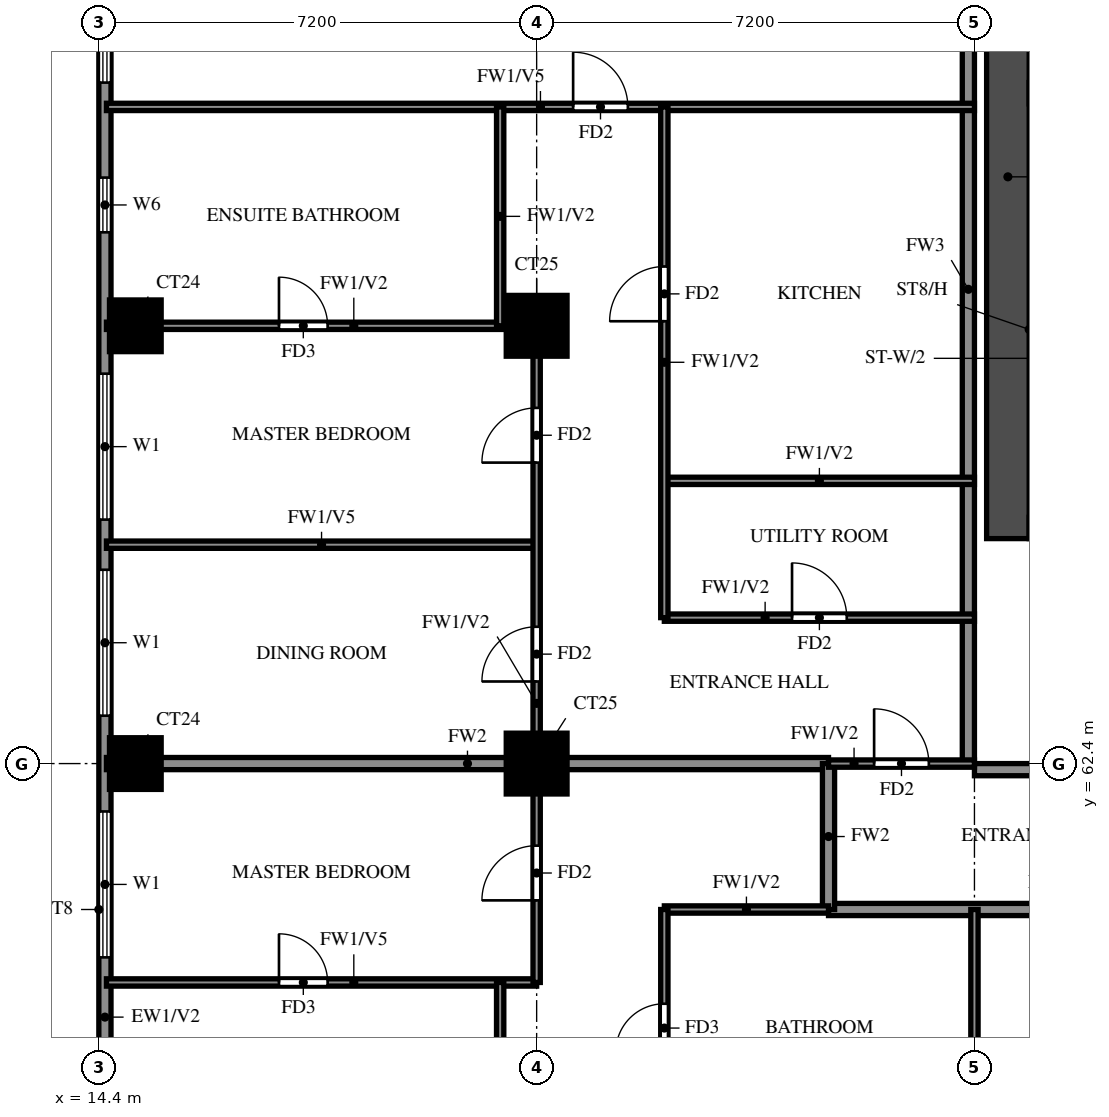
"""IFC4 building model, lengths in metres.
Left out: names, types, materials, properties, quantities, classifications, styles, units other than length and angle.
Written with IfcOpenShell. Run it as: python <this file> out.ifc"""

import sys

from ifc_helpers import new_model, si_unit, direction, frame, frame_2d, origin, origin_2d, place, context, subcontext, project, spatial, rectangle, extrude, source, transform, mapped, element, fill, save


model = new_model("IFC4")
c1 = context("Model", 3, precision=1e-05, world=origin(), true_north=direction((0.0, 1.0)))
c2 = subcontext(c1, "Body", "Model", "MODEL_VIEW")
j1 = project(units=[si_unit("LENGTHUNIT", "METRE"), si_unit("PLANEANGLEUNIT", "RADIAN")], contexts=[c1])
p1 = place(None, origin())
s1 = spatial("IfcSite", under=j1, at=p1, CompositionType="ELEMENT")
p2 = place(p1, origin())
s2 = spatial("IfcBuilding", under=s1, at=p2, CompositionType="ELEMENT")
p3 = place(p2, frame((0.0, 0.0, 146.5)))
s3 = spatial("IfcBuildingStorey", under=s2, at=p3, CompositionType="ELEMENT", Elevation=146.5)
m1 = source(origin(), c2, "Body", "SweptSolid", [
    extrude(rectangle(XDim=0.85, YDim=0.85, at=origin_2d()), origin(), (0.0, 0.0, 1.0), 3.2),
])
p4 = place(p3, frame((15.0, 62.4, 0.0), z_axis=(0.0, 0.0, 1.0), x_axis=(1.0, 0.0, 0.0)))
e1 = element("IfcColumn", 1, at=p4, inside=s3, PredefinedType="COLUMN", context=c2, shape_type="MappedRepresentation", body=[
    mapped(m1, transform((0.0, 0.0, 0.0))),
])
m2 = source(origin(), c2, "Body", "SweptSolid", [
    extrude(rectangle(XDim=1.0, YDim=1.0, at=origin_2d()), origin(), (0.0, 0.0, 1.0), 3.2),
])
p5 = place(p3, frame((21.6, 62.4, 0.0), z_axis=(0.0, 0.0, 1.0), x_axis=(1.0, 0.0, 0.0)))
e2 = element("IfcColumn", 2, at=p5, inside=s3, PredefinedType="COLUMN", context=c2, shape_type="MappedRepresentation", body=[
    mapped(m2, transform((0.0, 0.0, 0.0))),
])
p6 = place(p3, frame((15.0, 69.6, 0.0), z_axis=(0.0, 0.0, 1.0), x_axis=(1.0, 0.0, 0.0)))
e3 = element("IfcColumn", 3, at=p6, inside=s3, PredefinedType="COLUMN", context=c2, shape_type="MappedRepresentation", body=[
    mapped(m1, transform((0.0, 0.0, 0.0))),
])
p7 = place(p3, frame((21.6, 69.6, 0.0), z_axis=(0.0, 0.0, 1.0), x_axis=(1.0, 0.0, 0.0)))
e4 = element("IfcColumn", 4, at=p7, inside=s3, PredefinedType="COLUMN", context=c2, shape_type="MappedRepresentation", body=[
    mapped(m2, transform((0.0, 0.0, 0.0))),
])
p8 = place(p3, frame((29.35, 66.1, 0.0), z_axis=(0.0, 0.0, 1.0), x_axis=(0.0, 1.0, 0.0)))
e5 = element("IfcWall", 5, at=p8, inside=s3, PredefinedType="SHEAR", context=c2, shape_type="SweptSolid", body=[
    extrude(rectangle(XDim=11.9, YDim=0.7, at=frame_2d((5.95, 0.0))), origin(), (0.0, 0.0, 1.0), 3.2),
])
p9 = place(p3, frame((14.5, 76.6, 0.0), z_axis=(0.0, 0.0, 1.0), x_axis=(0.0, -1.0, 0.0)))
e6 = element("IfcWall", 6, at=p9, inside=s3, PredefinedType="SOLIDWALL", context=c2, shape_type="SweptSolid", body=[
    extrude(rectangle(XDim=33.4, YDim=0.2, at=frame_2d((16.7, 0.0))), origin(), (0.0, 0.0, 1.0), 3.2),
])
p10 = place(p9, frame((29.887, 0.0, 0.6)))
e7 = element("IfcOpeningElement", 7, at=p10, cuts=e6, PredefinedType="OPENING", context=c2, shape_type="SweptSolid", body=[
    extrude(rectangle(XDim=2.4, YDim=2.4, at=frame_2d((1.2, 1.2))), frame((0.0, 0.11, 0.0), z_axis=(0.0, -1.0, 0.0), x_axis=(1.0, 0.0, 0.0)), (0.0, 0.0, 1.0), 0.22),
])
p11 = place(p9, frame((22.358, 0.0, 0.6)))
e8 = element("IfcOpeningElement", 8, at=p11, cuts=e6, PredefinedType="OPENING", context=c2, shape_type="SweptSolid", body=[
    extrude(rectangle(XDim=2.4, YDim=2.4, at=frame_2d((1.2, 1.2))), frame((0.0, 0.11, 0.0), z_axis=(0.0, -1.0, 0.0), x_axis=(1.0, 0.0, 0.0)), (0.0, 0.0, 1.0), 0.22),
])
p12 = place(p9, frame((25.242, 0.0, 0.6)))
e9 = element("IfcOpeningElement", 9, at=p12, cuts=e6, PredefinedType="OPENING", context=c2, shape_type="SweptSolid", body=[
    extrude(rectangle(XDim=2.4, YDim=2.4, at=frame_2d((1.2, 1.2))), frame((0.0, 0.11, 0.0), z_axis=(0.0, -1.0, 0.0), x_axis=(1.0, 0.0, 0.0)), (0.0, 0.0, 1.0), 0.22),
])
p13 = place(p9, frame((14.988, 0.0, 0.6)))
e10 = element("IfcOpeningElement", 10, at=p13, cuts=e6, PredefinedType="OPENING", context=c2, shape_type="SweptSolid", body=[
    extrude(rectangle(XDim=2.4, YDim=2.4, at=frame_2d((1.2, 1.2))), frame((0.0, 0.11, 0.0), z_axis=(0.0, -1.0, 0.0), x_axis=(1.0, 0.0, 0.0)), (0.0, 0.0, 1.0), 0.22),
])
p14 = place(p9, frame((18.962, 0.0, 1.5)))
e11 = element("IfcOpeningElement", 11, at=p14, cuts=e6, PredefinedType="OPENING", context=c2, shape_type="SweptSolid", body=[
    extrude(rectangle(XDim=0.9, YDim=0.9, at=frame_2d((0.45, 0.45))), frame((0.0, 0.11, 0.0), z_axis=(0.0, -1.0, 0.0), x_axis=(1.0, 0.0, 0.0)), (0.0, 0.0, 1.0), 0.22),
])
p15 = place(p9, frame((11.012, 0.0, 0.6)))
e12 = element("IfcOpeningElement", 12, at=p15, cuts=e6, PredefinedType="OPENING", context=c2, shape_type="SweptSolid", body=[
    extrude(rectangle(XDim=2.4, YDim=2.4, at=frame_2d((1.2, 1.2))), frame((0.0, 0.11, 0.0), z_axis=(0.0, -1.0, 0.0), x_axis=(1.0, 0.0, 0.0)), (0.0, 0.0, 1.0), 0.22),
])
p16 = place(p9, frame((7.788, 0.0, 0.6)))
e13 = element("IfcOpeningElement", 13, at=p16, cuts=e6, PredefinedType="OPENING", context=c2, shape_type="SweptSolid", body=[
    extrude(rectangle(XDim=2.4, YDim=2.4, at=frame_2d((1.2, 1.2))), frame((0.0, 0.11, 0.0), z_axis=(0.0, -1.0, 0.0), x_axis=(1.0, 0.0, 0.0)), (0.0, 0.0, 1.0), 0.22),
])
p17 = place(p9, frame((4.562, 0.0, 1.5)))
e14 = element("IfcOpeningElement", 14, at=p17, cuts=e6, PredefinedType="OPENING", context=c2, shape_type="SweptSolid", body=[
    extrude(rectangle(XDim=0.9, YDim=0.9, at=frame_2d((0.45, 0.45))), frame((0.0, 0.11, 0.0), z_axis=(0.0, -1.0, 0.0), x_axis=(1.0, 0.0, 0.0)), (0.0, 0.0, 1.0), 0.22),
])
p18 = place(p9, frame((0.6, 0.0, 0.6)))
e15 = element("IfcOpeningElement", 15, at=p18, cuts=e6, PredefinedType="OPENING", context=c2, shape_type="SweptSolid", body=[
    extrude(rectangle(XDim=2.4, YDim=2.4, at=frame_2d((1.2, 1.2))), frame((0.0, 0.11, 0.0), z_axis=(0.0, -1.0, 0.0), x_axis=(1.0, 0.0, 0.0)), (0.0, 0.0, 1.0), 0.22),
])
p19 = place(p3, frame((28.8, 62.3, 0.0), z_axis=(0.0, 0.0, 1.0), x_axis=(1.0, 0.0, 0.0)))
e16 = element("IfcWall", 16, at=p19, inside=s3, PredefinedType="SOLIDWALL", context=c2, shape_type="SweptSolid", body=[
    extrude(rectangle(XDim=4.8, YDim=0.2, at=frame_2d((2.4, 0.0))), origin(), (0.0, 0.0, 1.0), 3.2),
])
p20 = place(p3, frame((28.7, 62.4, 0.0), z_axis=(0.0, 0.0, 1.0), x_axis=(0.0, 1.0, 0.0)))
e17 = element("IfcWall", 17, at=p20, inside=s3, PredefinedType="SOLIDWALL", context=c2, shape_type="SweptSolid", body=[
    extrude(rectangle(XDim=15.6, YDim=0.2, at=frame_2d((7.8, 0.0))), origin(), (0.0, 0.0, 1.0), 3.2),
])
p21 = place(p3, frame((26.4, 60.0, 0.0), z_axis=(0.0, 0.0, 1.0), x_axis=(1.0, 0.0, 0.0)))
e18 = element("IfcWall", 18, at=p21, inside=s3, PredefinedType="SOLIDWALL", context=c2, shape_type="SweptSolid", body=[
    extrude(rectangle(XDim=7.2, YDim=0.2, at=frame_2d((3.6, 0.0))), origin(), (0.0, 0.0, 1.0), 3.2),
])
p22 = place(p3, frame((14.525, 62.4, 0.0), z_axis=(0.0, 0.0, 1.0), x_axis=(1.0, 0.0, 0.0)))
e19 = element("IfcWall", 19, at=p22, inside=s3, PredefinedType="SOLIDWALL", context=c2, shape_type="SweptSolid", body=[
    extrude(rectangle(XDim=11.875, YDim=0.2, at=frame_2d((5.938, 0.0))), origin(), (0.0, 0.0, 1.0), 3.2),
])
p23 = place(p3, frame((26.4, 60.0, 0.0), z_axis=(0.0, 0.0, 1.0), x_axis=(0.0, 1.0, 0.0)))
e20 = element("IfcWall", 20, at=p23, inside=s3, PredefinedType="SOLIDWALL", context=c2, shape_type="SweptSolid", body=[
    extrude(rectangle(XDim=2.4, YDim=0.2, at=frame_2d((1.2, 0.0))), origin(), (0.0, 0.0, 1.0), 3.2),
])
p24 = place(p3, frame((14.525, 58.8, 0.0), z_axis=(0.0, 0.0, 1.0), x_axis=(1.0, 0.0, 0.0)))
e21 = element("IfcWall", 21, at=p24, inside=s3, PredefinedType="PARTITIONING", context=c2, shape_type="SweptSolid", body=[
    extrude(rectangle(XDim=7.075, YDim=0.12, at=frame_2d((3.538, 0.0))), origin(), (0.0, 0.0, 1.0), 2.3),
])
p25 = place(p24, frame((2.837, 0.0, 0.0)))
e22 = element("IfcOpeningElement", 22, at=p25, cuts=e21, PredefinedType="OPENING", context=c2, shape_type="SweptSolid", body=[
    extrude(rectangle(XDim=0.8, YDim=2.1, at=frame_2d((0.4, 1.05))), frame((0.0, 0.07, 0.0), z_axis=(0.0, -1.0, 0.0), x_axis=(1.0, 0.0, 0.0)), (0.0, 0.0, 1.0), 0.14),
])
p26 = place(p3, frame((23.7, 60.0, 0.0), z_axis=(0.0, 0.0, 1.0), x_axis=(1.0, 0.0, 0.0)))
e23 = element("IfcWall", 23, at=p26, inside=s3, PredefinedType="PARTITIONING", context=c2, shape_type="SweptSolid", body=[
    extrude(rectangle(XDim=2.7, YDim=0.12, at=frame_2d((1.35, 0.0))), origin(), (0.0, 0.0, 1.0), 3.2),
])
p27 = place(p3, frame((26.4, 62.4, 0.0), z_axis=(0.0, 0.0, 1.0), x_axis=(1.0, 0.0, 0.0)))
e24 = element("IfcWall", 24, at=p27, inside=s3, PredefinedType="PARTITIONING", context=c2, shape_type="SweptSolid", body=[
    extrude(rectangle(XDim=2.4, YDim=0.12, at=frame_2d((1.2, 0.0))), origin(), (0.0, 0.0, 1.0), 3.2),
])
p28 = place(p27, frame((0.75, 0.0, 0.0)))
e25 = element("IfcOpeningElement", 25, at=p28, cuts=e24, PredefinedType="OPENING", context=c2, shape_type="SweptSolid", body=[
    extrude(rectangle(XDim=0.9, YDim=2.1, at=frame_2d((0.45, 1.05))), frame((0.0, 0.07, 0.0), z_axis=(0.0, -1.0, 0.0), x_axis=(1.0, 0.0, 0.0)), (0.0, 0.0, 1.0), 0.14),
])
p29 = place(p3, frame((23.7, 64.8, 0.0), z_axis=(0.0, 0.0, 1.0), x_axis=(1.0, 0.0, 0.0)))
e26 = element("IfcWall", 26, at=p29, inside=s3, PredefinedType="PARTITIONING", context=c2, shape_type="SweptSolid", body=[
    extrude(rectangle(XDim=5.1, YDim=0.12, at=frame_2d((2.55, 0.0))), origin(), (0.0, 0.0, 1.0), 3.2),
])
p30 = place(p29, frame((2.1, 0.0, 0.0)))
e27 = element("IfcOpeningElement", 27, at=p30, cuts=e26, PredefinedType="OPENING", context=c2, shape_type="SweptSolid", body=[
    extrude(rectangle(XDim=0.9, YDim=2.1, at=frame_2d((0.45, 1.05))), frame((0.0, 0.07, 0.0), z_axis=(0.0, -1.0, 0.0), x_axis=(1.0, 0.0, 0.0)), (0.0, 0.0, 1.0), 0.14),
])
p31 = place(p3, frame((14.525, 66.0, 0.0), z_axis=(0.0, 0.0, 1.0), x_axis=(1.0, 0.0, 0.0)))
e28 = element("IfcWall", 28, at=p31, inside=s3, PredefinedType="PARTITIONING", context=c2, shape_type="SweptSolid", body=[
    extrude(rectangle(XDim=7.075, YDim=0.12, at=frame_2d((3.538, 0.0))), origin(), (0.0, 0.0, 1.0), 2.3),
])
p32 = place(p3, frame((23.7, 67.05, 0.0), z_axis=(0.0, 0.0, 1.0), x_axis=(1.0, 0.0, 0.0)))
e29 = element("IfcWall", 29, at=p32, inside=s3, PredefinedType="PARTITIONING", context=c2, shape_type="SweptSolid", body=[
    extrude(rectangle(XDim=5.1, YDim=0.12, at=frame_2d((2.55, 0.0))), origin(), (0.0, 0.0, 1.0), 3.2),
])
p33 = place(p3, frame((14.525, 69.6, 0.0), z_axis=(0.0, 0.0, 1.0), x_axis=(1.0, 0.0, 0.0)))
e30 = element("IfcWall", 30, at=p33, inside=s3, PredefinedType="PARTITIONING", context=c2, shape_type="SweptSolid", body=[
    extrude(rectangle(XDim=7.075, YDim=0.12, at=frame_2d((3.538, 0.0))), origin(), (0.0, 0.0, 1.0), 3.2),
])
p34 = place(p33, frame((2.837, 0.0, 0.0)))
e31 = element("IfcOpeningElement", 31, at=p34, cuts=e30, PredefinedType="OPENING", context=c2, shape_type="SweptSolid", body=[
    extrude(rectangle(XDim=0.8, YDim=2.1, at=frame_2d((0.4, 1.05))), frame((0.0, 0.07, 0.0), z_axis=(0.0, -1.0, 0.0), x_axis=(1.0, 0.0, 0.0)), (0.0, 0.0, 1.0), 0.14),
])
p35 = place(p3, frame((14.525, 73.2, 0.0), z_axis=(0.0, 0.0, 1.0), x_axis=(1.0, 0.0, 0.0)))
e32 = element("IfcWall", 32, at=p35, inside=s3, PredefinedType="PARTITIONING", context=c2, shape_type="SweptSolid", body=[
    extrude(rectangle(XDim=14.275, YDim=0.12, at=frame_2d((7.138, 0.0))), origin(), (0.0, 0.0, 1.0), 2.3),
])
p36 = place(p35, frame((7.675, 0.0, 0.0)))
e33 = element("IfcOpeningElement", 33, at=p36, cuts=e32, PredefinedType="OPENING", context=c2, shape_type="SweptSolid", body=[
    extrude(rectangle(XDim=0.9, YDim=2.1, at=frame_2d((0.45, 1.05))), frame((0.0, 0.07, 0.0), z_axis=(0.0, -1.0, 0.0), x_axis=(1.0, 0.0, 0.0)), (0.0, 0.0, 1.0), 0.14),
])
p37 = place(p3, frame((21.0, 55.2, 0.0), z_axis=(0.0, 0.0, 1.0), x_axis=(0.0, 1.0, 0.0)))
e34 = element("IfcWall", 34, at=p37, inside=s3, PredefinedType="PARTITIONING", context=c2, shape_type="SweptSolid", body=[
    extrude(rectangle(XDim=3.6, YDim=0.12, at=frame_2d((1.8, 0.0))), origin(), (0.0, 0.0, 1.0), 3.2),
])
p38 = place(p3, frame((21.0, 69.6, 0.0), z_axis=(0.0, 0.0, 1.0), x_axis=(0.0, 1.0, 0.0)))
e35 = element("IfcWall", 35, at=p38, inside=s3, PredefinedType="PARTITIONING", context=c2, shape_type="SweptSolid", body=[
    extrude(rectangle(XDim=3.6, YDim=0.12, at=frame_2d((1.8, 0.0))), origin(), (0.0, 0.0, 1.0), 3.2),
])
p39 = place(p3, frame((21.6, 58.8, 0.0), z_axis=(0.0, 0.0, 1.0), x_axis=(0.0, 1.0, 0.0)))
e36 = element("IfcWall", 36, at=p39, inside=s3, PredefinedType="PARTITIONING", context=c2, shape_type="SweptSolid", body=[
    extrude(rectangle(XDim=10.8, YDim=0.12, at=frame_2d((5.4, 0.0))), origin(), (0.0, 0.0, 1.0), 3.2),
])
p40 = place(p39, frame((1.35, 0.0, 0.0)))
e37 = element("IfcOpeningElement", 37, at=p40, cuts=e36, PredefinedType="OPENING", context=c2, shape_type="SweptSolid", body=[
    extrude(rectangle(XDim=0.9, YDim=2.1, at=frame_2d((0.45, 1.05))), frame((0.0, 0.07, 0.0), z_axis=(0.0, -1.0, 0.0), x_axis=(1.0, 0.0, 0.0)), (0.0, 0.0, 1.0), 0.14),
])
p41 = place(p39, frame((4.95, 0.0, 0.0)))
e38 = element("IfcOpeningElement", 38, at=p41, cuts=e36, PredefinedType="OPENING", context=c2, shape_type="SweptSolid", body=[
    extrude(rectangle(XDim=0.9, YDim=2.1, at=frame_2d((0.45, 1.05))), frame((0.0, 0.07, 0.0), z_axis=(0.0, -1.0, 0.0), x_axis=(1.0, 0.0, 0.0)), (0.0, 0.0, 1.0), 0.14),
])
p42 = place(p39, frame((8.55, 0.0, 0.0)))
e39 = element("IfcOpeningElement", 39, at=p42, cuts=e36, PredefinedType="OPENING", context=c2, shape_type="SweptSolid", body=[
    extrude(rectangle(XDim=0.9, YDim=2.1, at=frame_2d((0.45, 1.05))), frame((0.0, 0.07, 0.0), z_axis=(0.0, -1.0, 0.0), x_axis=(1.0, 0.0, 0.0)), (0.0, 0.0, 1.0), 0.14),
])
p43 = place(p3, frame((23.7, 54.0, 0.0), z_axis=(0.0, 0.0, 1.0), x_axis=(0.0, 1.0, 0.0)))
e40 = element("IfcWall", 40, at=p43, inside=s3, PredefinedType="PARTITIONING", context=c2, shape_type="SweptSolid", body=[
    extrude(rectangle(XDim=6.0, YDim=0.12, at=frame_2d((3.0, 0.0))), origin(), (0.0, 0.0, 1.0), 3.2),
])
p44 = place(p43, frame((3.65, 0.0, 0.0)))
e41 = element("IfcOpeningElement", 41, at=p44, cuts=e40, PredefinedType="OPENING", context=c2, shape_type="SweptSolid", body=[
    extrude(rectangle(XDim=0.8, YDim=2.1, at=frame_2d((0.4, 1.05))), frame((0.0, 0.07, 0.0), z_axis=(0.0, -1.0, 0.0), x_axis=(1.0, 0.0, 0.0)), (0.0, 0.0, 1.0), 0.14),
])
p45 = place(p3, frame((23.7, 64.8, 0.0), z_axis=(0.0, 0.0, 1.0), x_axis=(0.0, 1.0, 0.0)))
e42 = element("IfcWall", 42, at=p45, inside=s3, PredefinedType="PARTITIONING", context=c2, shape_type="SweptSolid", body=[
    extrude(rectangle(XDim=8.4, YDim=0.12, at=frame_2d((4.2, 0.0))), origin(), (0.0, 0.0, 1.0), 3.2),
])
p46 = place(p45, frame((4.875, 0.0, 0.0)))
e43 = element("IfcOpeningElement", 43, at=p46, cuts=e42, PredefinedType="OPENING", context=c2, shape_type="SweptSolid", body=[
    extrude(rectangle(XDim=0.9, YDim=2.1, at=frame_2d((0.45, 1.05))), frame((0.0, 0.07, 0.0), z_axis=(0.0, -1.0, 0.0), x_axis=(1.0, 0.0, 0.0)), (0.0, 0.0, 1.0), 0.14),
])
p47 = place(p3, frame((28.8, 54.0, 0.0), z_axis=(0.0, 0.0, 1.0), x_axis=(0.0, 1.0, 0.0)))
e44 = element("IfcWall", 44, at=p47, inside=s3, PredefinedType="PARTITIONING", context=c2, shape_type="SweptSolid", body=[
    extrude(rectangle(XDim=6.0, YDim=0.12, at=frame_2d((3.0, 0.0))), origin(), (0.0, 0.0, 1.0), 3.2),
])
p48 = place(p13, origin())
e45 = element("IfcWindow", 45, at=p48, inside=s3, PartitioningType="DOUBLE_PANEL_VERTICAL", PredefinedType="WINDOW", context=c2, shape_type="SweptSolid", body=[
    extrude(rectangle(XDim=2.4, YDim=2.4, at=frame_2d((1.2, 1.2))), frame((0.0, 0.03, 0.0), z_axis=(0.0, -1.0, 0.0), x_axis=(1.0, 0.0, 0.0)), (0.0, 0.0, 1.0), 0.06),
])
fill(e10, e45)
p49 = place(p15, origin())
e46 = element("IfcWindow", 46, at=p49, inside=s3, PartitioningType="DOUBLE_PANEL_VERTICAL", PredefinedType="WINDOW", context=c2, shape_type="SweptSolid", body=[
    extrude(rectangle(XDim=2.4, YDim=2.4, at=frame_2d((1.2, 1.2))), frame((0.0, 0.03, 0.0), z_axis=(0.0, -1.0, 0.0), x_axis=(1.0, 0.0, 0.0)), (0.0, 0.0, 1.0), 0.06),
])
fill(e12, e46)
p50 = place(p16, origin())
e47 = element("IfcWindow", 47, at=p50, inside=s3, PartitioningType="DOUBLE_PANEL_VERTICAL", PredefinedType="WINDOW", context=c2, shape_type="SweptSolid", body=[
    extrude(rectangle(XDim=2.4, YDim=2.4, at=frame_2d((1.2, 1.2))), frame((0.0, 0.03, 0.0), z_axis=(0.0, -1.0, 0.0), x_axis=(1.0, 0.0, 0.0)), (0.0, 0.0, 1.0), 0.06),
])
fill(e13, e47)
p51 = place(p17, origin())
e48 = element("IfcWindow", 48, at=p51, inside=s3, PartitioningType="SINGLE_PANEL", PredefinedType="WINDOW", context=c2, shape_type="SweptSolid", body=[
    extrude(rectangle(XDim=0.9, YDim=0.9, at=frame_2d((0.45, 0.45))), frame((0.0, 0.03, 0.0), z_axis=(0.0, -1.0, 0.0), x_axis=(1.0, 0.0, 0.0)), (0.0, 0.0, 1.0), 0.06),
])
fill(e14, e48)
p52 = place(p18, origin())
e49 = element("IfcWindow", 49, at=p52, inside=s3, PartitioningType="DOUBLE_PANEL_VERTICAL", PredefinedType="WINDOW", context=c2, shape_type="SweptSolid", body=[
    extrude(rectangle(XDim=2.4, YDim=2.4, at=frame_2d((1.2, 1.2))), frame((0.0, 0.03, 0.0), z_axis=(0.0, -1.0, 0.0), x_axis=(1.0, 0.0, 0.0)), (0.0, 0.0, 1.0), 0.06),
])
fill(e15, e49)
p53 = place(p40, origin())
e50 = element("IfcDoor", 50, at=p53, inside=s3, OperationType="SINGLE_SWING_LEFT", PredefinedType="DOOR", context=c2, shape_type="SweptSolid", body=[
    extrude(rectangle(XDim=0.9, YDim=2.1, at=frame_2d((0.45, 1.05))), frame((0.0, 0.025, 0.0), z_axis=(0.0, -1.0, 0.0), x_axis=(1.0, 0.0, 0.0)), (0.0, 0.0, 1.0), 0.05),
])
fill(e37, e50)
p54 = place(p25, origin())
e51 = element("IfcDoor", 51, at=p54, inside=s3, OperationType="SINGLE_SWING_LEFT", PredefinedType="DOOR", context=c2, shape_type="SweptSolid", body=[
    extrude(rectangle(XDim=0.8, YDim=2.1, at=frame_2d((0.4, 1.05))), frame((0.0, 0.025, 0.0), z_axis=(0.0, -1.0, 0.0), x_axis=(1.0, 0.0, 0.0)), (0.0, 0.0, 1.0), 0.05),
])
fill(e22, e51)
p55 = place(p44, origin())
e52 = element("IfcDoor", 52, at=p55, inside=s3, OperationType="SINGLE_SWING_LEFT", PredefinedType="DOOR", context=c2, shape_type="SweptSolid", body=[
    extrude(rectangle(XDim=0.8, YDim=2.1, at=frame_2d((0.4, 1.05))), frame((0.0, 0.025, 0.0), z_axis=(0.0, -1.0, 0.0), x_axis=(1.0, 0.0, 0.0)), (0.0, 0.0, 1.0), 0.05),
])
fill(e41, e52)
p56 = place(p28, origin())
e53 = element("IfcDoor", 53, at=p56, inside=s3, OperationType="SINGLE_SWING_LEFT", PredefinedType="DOOR", context=c2, shape_type="SweptSolid", body=[
    extrude(rectangle(XDim=0.9, YDim=2.1, at=frame_2d((0.45, 1.05))), frame((0.0, 0.025, 0.0), z_axis=(0.0, -1.0, 0.0), x_axis=(1.0, 0.0, 0.0)), (0.0, 0.0, 1.0), 0.05),
])
fill(e25, e53)
p57 = place(p41, origin())
e54 = element("IfcDoor", 54, at=p57, inside=s3, OperationType="SINGLE_SWING_LEFT", PredefinedType="DOOR", context=c2, shape_type="SweptSolid", body=[
    extrude(rectangle(XDim=0.9, YDim=2.1, at=frame_2d((0.45, 1.05))), frame((0.0, 0.025, 0.0), z_axis=(0.0, -1.0, 0.0), x_axis=(1.0, 0.0, 0.0)), (0.0, 0.0, 1.0), 0.05),
])
fill(e38, e54)
p58 = place(p42, origin())
e55 = element("IfcDoor", 55, at=p58, inside=s3, OperationType="SINGLE_SWING_LEFT", PredefinedType="DOOR", context=c2, shape_type="SweptSolid", body=[
    extrude(rectangle(XDim=0.9, YDim=2.1, at=frame_2d((0.45, 1.05))), frame((0.0, 0.025, 0.0), z_axis=(0.0, -1.0, 0.0), x_axis=(1.0, 0.0, 0.0)), (0.0, 0.0, 1.0), 0.05),
])
fill(e39, e55)
p59 = place(p34, origin())
e56 = element("IfcDoor", 56, at=p59, inside=s3, OperationType="SINGLE_SWING_RIGHT", PredefinedType="DOOR", context=c2, shape_type="SweptSolid", body=[
    extrude(rectangle(XDim=0.8, YDim=2.1, at=frame_2d((0.4, 1.05))), frame((0.0, 0.025, 0.0), z_axis=(0.0, -1.0, 0.0), x_axis=(1.0, 0.0, 0.0)), (0.0, 0.0, 1.0), 0.05),
])
fill(e31, e56)
p60 = place(p36, origin())
e57 = element("IfcDoor", 57, at=p60, inside=s3, OperationType="SINGLE_SWING_LEFT", PredefinedType="DOOR", context=c2, shape_type="SweptSolid", body=[
    extrude(rectangle(XDim=0.9, YDim=2.1, at=frame_2d((0.45, 1.05))), frame((0.0, 0.025, 0.0), z_axis=(0.0, -1.0, 0.0), x_axis=(1.0, 0.0, 0.0)), (0.0, 0.0, 1.0), 0.05),
])
fill(e33, e57)
p61 = place(p30, origin())
e58 = element("IfcDoor", 58, at=p61, inside=s3, OperationType="SINGLE_SWING_LEFT", PredefinedType="DOOR", context=c2, shape_type="SweptSolid", body=[
    extrude(rectangle(XDim=0.9, YDim=2.1, at=frame_2d((0.45, 1.05))), frame((0.0, 0.025, 0.0), z_axis=(0.0, -1.0, 0.0), x_axis=(1.0, 0.0, 0.0)), (0.0, 0.0, 1.0), 0.05),
])
fill(e27, e58)
p62 = place(p46, origin())
e59 = element("IfcDoor", 59, at=p62, inside=s3, OperationType="SINGLE_SWING_RIGHT", PredefinedType="DOOR", context=c2, shape_type="SweptSolid", body=[
    extrude(rectangle(XDim=0.9, YDim=2.1, at=frame_2d((0.45, 1.05))), frame((0.0, 0.025, 0.0), z_axis=(0.0, -1.0, 0.0), x_axis=(1.0, 0.0, 0.0)), (0.0, 0.0, 1.0), 0.05),
])
fill(e43, e59)
save(model, sys.argv[1])
